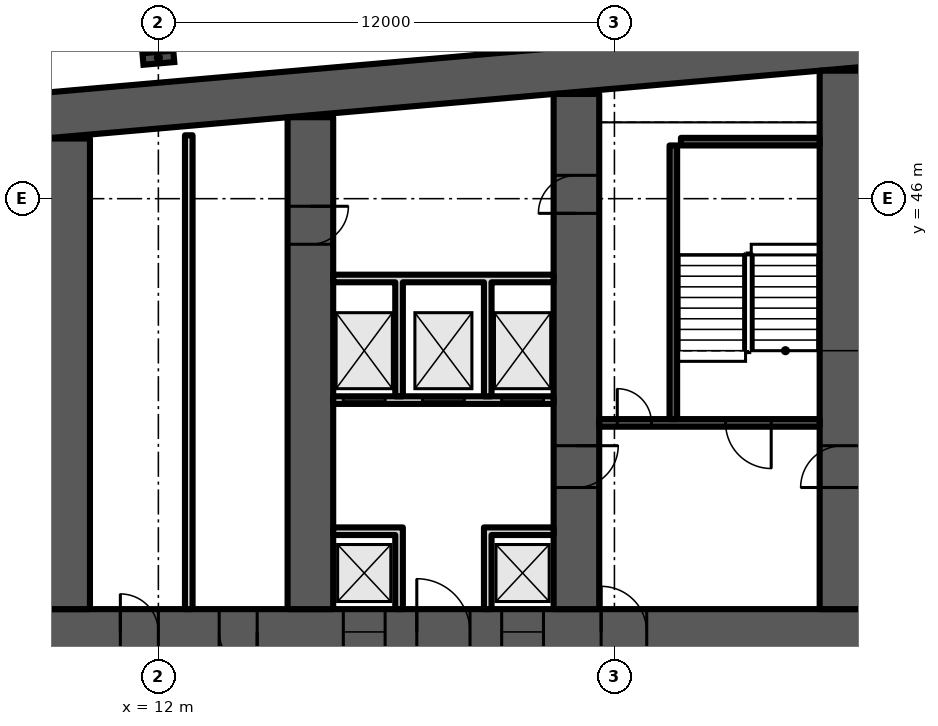
"""IFC4 building model, lengths in metres.
Left out: names, types, materials, properties, quantities, classifications, styles, units other than length and angle.
Written with IfcOpenShell. Run it as: python <this file> out.ifc"""

import sys

from ifc_helpers import new_model, si_unit, direction, frame, frame_2d, origin, origin_2d, place, context, subcontext, project, spatial, polyline, rectangle, i_section, outline, extrude, element, fill, save


model = new_model("IFC4")
c1 = context("Model", 3, precision=1e-05, world=origin(), true_north=direction((0.0, 1.0)))
c2 = subcontext(c1, "Body", "Model", "MODEL_VIEW")
j1 = project(units=[si_unit("LENGTHUNIT", "METRE"), si_unit("PLANEANGLEUNIT", "RADIAN")], contexts=[c1])
p1 = place(None, origin())
s1 = spatial("IfcSite", under=j1, at=p1, CompositionType="ELEMENT")
p2 = place(p1, origin())
s2 = spatial("IfcBuilding", under=s1, at=p2, CompositionType="ELEMENT")
p3 = place(p2, frame((0.0, 0.0, 81.1)))
s3 = spatial("IfcBuildingStorey", under=s2, at=p3, CompositionType="ELEMENT", Elevation=81.1)
p4 = place(p3, frame((0.0, 0.0, -0.0)))
e1 = element("IfcWall", 1, at=p4, inside=s3, PredefinedType="SHEAR", context=c2, shape_type="SweptSolid", body=[
    extrude(outline(polyline([(9.0, 47.583), (37.0, 50.032), (65.0, 47.583), (65.0, 48.787), (37.0, 51.237), (9.0, 48.787), (9.0, 47.583)])), origin(), (0.0, 0.0, 1.0), 3.6),
])
p5 = place(p3, frame((9.0, 34.6, 0.0), z_axis=(0.0, 0.0, 1.0), x_axis=(1.0, 0.0, 0.0)))
e2 = element("IfcWall", 2, at=p5, inside=s3, PredefinedType="SHEAR", context=c2, shape_type="SweptSolid", body=[
    extrude(rectangle(XDim=56.0, YDim=1.2, at=frame_2d((28.0, 0.0))), origin(), (0.0, 0.0, 1.0), 3.6),
])
p6 = place(p5, frame((2.0, 0.0, 0.0)))
e3 = element("IfcOpeningElement", 3, at=p6, cuts=e2, PredefinedType="OPENING", context=c2, shape_type="SweptSolid", body=[
    extrude(rectangle(XDim=1.0, YDim=2.1, at=frame_2d((0.5, 1.05))), frame((0.0, 0.61, 0.0), z_axis=(0.0, -1.0, 0.0), x_axis=(1.0, 0.0, 0.0)), (0.0, 0.0, 1.0), 1.22),
])
p7 = place(p5, frame((4.6, 0.0, 0.0)))
e4 = element("IfcOpeningElement", 4, at=p7, cuts=e2, PredefinedType="OPENING", context=c2, shape_type="SweptSolid", body=[
    extrude(rectangle(XDim=1.0, YDim=2.1, at=frame_2d((0.5, 1.05))), frame((0.0, 0.61, 0.0), z_axis=(0.0, -1.0, 0.0), x_axis=(1.0, 0.0, 0.0)), (0.0, 0.0, 1.0), 1.22),
])
p8 = place(p5, frame((7.867, 0.0, 0.0)))
e5 = element("IfcOpeningElement", 5, at=p8, cuts=e2, PredefinedType="OPENING", context=c2, shape_type="SweptSolid", body=[
    extrude(rectangle(XDim=1.1, YDim=2.1, at=frame_2d((0.55, 1.05))), frame((0.0, 0.61, 0.0), z_axis=(0.0, -1.0, 0.0), x_axis=(1.0, 0.0, 0.0)), (0.0, 0.0, 1.0), 1.22),
])
p9 = place(p5, frame((12.033, 0.0, 0.0)))
e6 = element("IfcOpeningElement", 6, at=p9, cuts=e2, PredefinedType="OPENING", context=c2, shape_type="SweptSolid", body=[
    extrude(rectangle(XDim=1.1, YDim=2.1, at=frame_2d((0.55, 1.05))), frame((0.0, 0.61, 0.0), z_axis=(0.0, -1.0, 0.0), x_axis=(1.0, 0.0, 0.0)), (0.0, 0.0, 1.0), 1.22),
])
p10 = place(p5, frame((9.8, 0.0, 0.0)))
e7 = element("IfcOpeningElement", 7, at=p10, cuts=e2, PredefinedType="OPENING", context=c2, shape_type="SweptSolid", body=[
    extrude(rectangle(XDim=1.4, YDim=2.1, at=frame_2d((0.7, 1.05))), frame((0.0, 0.61, 0.0), z_axis=(0.0, -1.0, 0.0), x_axis=(1.0, 0.0, 0.0)), (0.0, 0.0, 1.0), 1.22),
])
p11 = place(p5, frame((14.65, 0.0, 0.0)))
e8 = element("IfcOpeningElement", 8, at=p11, cuts=e2, PredefinedType="OPENING", context=c2, shape_type="SweptSolid", body=[
    extrude(rectangle(XDim=1.2, YDim=2.1, at=frame_2d((0.6, 1.05))), frame((0.0, 0.61, 0.0), z_axis=(0.0, -1.0, 0.0), x_axis=(1.0, 0.0, 0.0)), (0.0, 0.0, 1.0), 1.22),
])
p12 = place(p5, frame((21.867, 0.0, 0.0)))
e9 = element("IfcOpeningElement", 9, at=p12, cuts=e2, PredefinedType="OPENING", context=c2, shape_type="SweptSolid", body=[
    extrude(rectangle(XDim=1.1, YDim=2.1, at=frame_2d((0.55, 1.05))), frame((0.0, 0.61, 0.0), z_axis=(0.0, -1.0, 0.0), x_axis=(1.0, 0.0, 0.0)), (0.0, 0.0, 1.0), 1.22),
])
p13 = place(p5, frame((26.033, 0.0, 0.0)))
e10 = element("IfcOpeningElement", 10, at=p13, cuts=e2, PredefinedType="OPENING", context=c2, shape_type="SweptSolid", body=[
    extrude(rectangle(XDim=1.1, YDim=2.1, at=frame_2d((0.55, 1.05))), frame((0.0, 0.61, 0.0), z_axis=(0.0, -1.0, 0.0), x_axis=(1.0, 0.0, 0.0)), (0.0, 0.0, 1.0), 1.22),
])
p14 = place(p5, frame((23.8, 0.0, 0.0)))
e11 = element("IfcOpeningElement", 11, at=p14, cuts=e2, PredefinedType="OPENING", context=c2, shape_type="SweptSolid", body=[
    extrude(rectangle(XDim=1.4, YDim=2.1, at=frame_2d((0.7, 1.05))), frame((0.0, 0.61, 0.0), z_axis=(0.0, -1.0, 0.0), x_axis=(1.0, 0.0, 0.0)), (0.0, 0.0, 1.0), 1.22),
])
p15 = place(p5, frame((28.867, 0.0, 0.0)))
e12 = element("IfcOpeningElement", 12, at=p15, cuts=e2, PredefinedType="OPENING", context=c2, shape_type="SweptSolid", body=[
    extrude(rectangle(XDim=1.1, YDim=2.1, at=frame_2d((0.55, 1.05))), frame((0.0, 0.61, 0.0), z_axis=(0.0, -1.0, 0.0), x_axis=(1.0, 0.0, 0.0)), (0.0, 0.0, 1.0), 1.22),
])
p16 = place(p5, frame((33.033, 0.0, 0.0)))
e13 = element("IfcOpeningElement", 13, at=p16, cuts=e2, PredefinedType="OPENING", context=c2, shape_type="SweptSolid", body=[
    extrude(rectangle(XDim=1.1, YDim=2.1, at=frame_2d((0.55, 1.05))), frame((0.0, 0.61, 0.0), z_axis=(0.0, -1.0, 0.0), x_axis=(1.0, 0.0, 0.0)), (0.0, 0.0, 1.0), 1.22),
])
p17 = place(p5, frame((40.15, 0.0, 0.0)))
e14 = element("IfcOpeningElement", 14, at=p17, cuts=e2, PredefinedType="OPENING", context=c2, shape_type="SweptSolid", body=[
    extrude(rectangle(XDim=1.2, YDim=2.1, at=frame_2d((0.6, 1.05))), frame((0.0, 0.61, 0.0), z_axis=(0.0, -1.0, 0.0), x_axis=(1.0, 0.0, 0.0)), (0.0, 0.0, 1.0), 1.22),
])
p18 = place(p5, frame((44.8, 0.0, 0.0)))
e15 = element("IfcOpeningElement", 15, at=p18, cuts=e2, PredefinedType="OPENING", context=c2, shape_type="SweptSolid", body=[
    extrude(rectangle(XDim=1.4, YDim=2.1, at=frame_2d((0.7, 1.05))), frame((0.0, 0.61, 0.0), z_axis=(0.0, -1.0, 0.0), x_axis=(1.0, 0.0, 0.0)), (0.0, 0.0, 1.0), 1.22),
])
p19 = place(p5, frame((49.867, 0.0, 0.0)))
e16 = element("IfcOpeningElement", 16, at=p19, cuts=e2, PredefinedType="OPENING", context=c2, shape_type="SweptSolid", body=[
    extrude(rectangle(XDim=1.1, YDim=2.1, at=frame_2d((0.55, 1.05))), frame((0.0, 0.61, 0.0), z_axis=(0.0, -1.0, 0.0), x_axis=(1.0, 0.0, 0.0)), (0.0, 0.0, 1.0), 1.22),
])
p20 = place(p5, frame((53.5, 0.0, 0.0)))
e17 = element("IfcOpeningElement", 17, at=p20, cuts=e2, PredefinedType="OPENING", context=c2, shape_type="SweptSolid", body=[
    extrude(rectangle(XDim=1.1, YDim=2.1, at=frame_2d((0.55, 1.05))), frame((0.0, 0.61, 0.0), z_axis=(0.0, -1.0, 0.0), x_axis=(1.0, 0.0, 0.0)), (0.0, 0.0, 1.0), 1.22),
])
p21 = place(p5, frame((51.567, 0.0, 0.0)))
e18 = element("IfcOpeningElement", 18, at=p21, cuts=e2, PredefinedType="OPENING", context=c2, shape_type="SweptSolid", body=[
    extrude(rectangle(XDim=1.4, YDim=2.1, at=frame_2d((0.7, 1.05))), frame((0.0, 0.61, 0.0), z_axis=(0.0, -1.0, 0.0), x_axis=(1.0, 0.0, 0.0)), (0.0, 0.0, 1.0), 1.22),
])
p22 = place(p3, frame((9.6, 35.2, 0.0), z_axis=(0.0, 0.0, 1.0), x_axis=(0.0, 1.0, 0.0)))
e19 = element("IfcWall", 19, at=p22, inside=s3, PredefinedType="SHEAR", context=c2, shape_type="SweptSolid", body=[
    extrude(rectangle(XDim=12.383, YDim=1.2, at=frame_2d((6.191, 0.0))), origin(), (0.0, 0.0, 1.0), 3.6),
])
p23 = place(p3, frame((16.0, 35.2, 0.0), z_axis=(0.0, 0.0, 1.0), x_axis=(0.0, 1.0, 0.0)))
e20 = element("IfcWall", 20, at=p23, inside=s3, PredefinedType="SHEAR", context=c2, shape_type="SweptSolid", body=[
    extrude(rectangle(XDim=12.943, YDim=1.2, at=frame_2d((6.471, 0.0))), origin(), (0.0, 0.0, 1.0), 3.6),
])
p24 = place(p23, frame((9.6, 0.0, 0.0)))
e21 = element("IfcOpeningElement", 21, at=p24, cuts=e20, PredefinedType="OPENING", context=c2, shape_type="SweptSolid", body=[
    extrude(rectangle(XDim=1.0, YDim=2.1, at=frame_2d((0.5, 1.05))), frame((0.0, 0.61, 0.0), z_axis=(0.0, -1.0, 0.0), x_axis=(1.0, 0.0, 0.0)), (0.0, 0.0, 1.0), 1.22),
])
p25 = place(p3, frame((23.0, 35.2, 0.0), z_axis=(0.0, 0.0, 1.0), x_axis=(0.0, 1.0, 0.0)))
e22 = element("IfcWall", 22, at=p25, inside=s3, PredefinedType="SHEAR", context=c2, shape_type="SweptSolid", body=[
    extrude(rectangle(XDim=13.555, YDim=1.2, at=frame_2d((6.778, 0.0))), origin(), (0.0, 0.0, 1.0), 3.6),
])
p26 = place(p25, frame((10.414, 0.0, 0.0)))
e23 = element("IfcOpeningElement", 23, at=p26, cuts=e22, PredefinedType="OPENING", context=c2, shape_type="SweptSolid", body=[
    extrude(rectangle(XDim=1.0, YDim=2.1, at=frame_2d((0.5, 1.05))), frame((0.0, 0.61, 0.0), z_axis=(0.0, -1.0, 0.0), x_axis=(1.0, 0.0, 0.0)), (0.0, 0.0, 1.0), 1.22),
])
p27 = place(p25, frame((3.2, 0.0, 0.0)))
e24 = element("IfcOpeningElement", 24, at=p27, cuts=e22, PredefinedType="OPENING", context=c2, shape_type="SweptSolid", body=[
    extrude(rectangle(XDim=1.1, YDim=2.1, at=frame_2d((0.55, 1.05))), frame((0.0, 0.61, 0.0), z_axis=(0.0, -1.0, 0.0), x_axis=(1.0, 0.0, 0.0)), (0.0, 0.0, 1.0), 1.22),
])
p28 = place(p3, frame((30.0, 35.2, 0.0), z_axis=(0.0, 0.0, 1.0), x_axis=(0.0, 1.0, 0.0)))
e25 = element("IfcWall", 25, at=p28, inside=s3, PredefinedType="SHEAR", context=c2, shape_type="SweptSolid", body=[
    extrude(rectangle(XDim=14.168, YDim=1.2, at=frame_2d((7.084, 0.0))), origin(), (0.0, 0.0, 1.0), 3.6),
])
p29 = place(p28, frame((3.2, 0.0, 0.0)))
e26 = element("IfcOpeningElement", 26, at=p29, cuts=e25, PredefinedType="OPENING", context=c2, shape_type="SweptSolid", body=[
    extrude(rectangle(XDim=1.1, YDim=2.1, at=frame_2d((0.55, 1.05))), frame((0.0, 0.61, 0.0), z_axis=(0.0, -1.0, 0.0), x_axis=(1.0, 0.0, 0.0)), (0.0, 0.0, 1.0), 1.22),
])
p30 = place(p3, frame((12.0, 49.71, 0.0), z_axis=(0.0, 0.0, 1.0), x_axis=(-0.087156, 0.996197, 0.0)))
e27 = element("IfcColumn", 27, at=p30, inside=s3, PredefinedType="COLUMN", context=c2, shape_type="SweptSolid", body=[
    extrude(i_section(OverallWidth=0.303, OverallDepth=0.814, WebThickness=0.021, FlangeThickness=0.04, FilletRadius=0.03, at=origin_2d()), origin(), (0.0, 0.0, 1.0), 3.6),
])
p31 = place(p3, frame((12.8, 35.2, 0.0), z_axis=(0.0, 0.0, 1.0), x_axis=(0.0, 1.0, 0.0)))
e28 = element("IfcWall", 28, at=p31, inside=s3, PredefinedType="PARTITIONING", context=c2, shape_type="SweptSolid", body=[
    extrude(rectangle(XDim=12.468, YDim=0.2, at=frame_2d((6.234, 0.0))), origin(), (0.0, 0.0, 1.0), 3.2),
])
p32 = place(p3, frame((16.6, 40.7, 0.0), z_axis=(0.0, 0.0, 1.0), x_axis=(1.0, 0.0, 0.0)))
e29 = element("IfcWall", 29, at=p32, inside=s3, PredefinedType="PARTITIONING", context=c2, shape_type="SweptSolid", body=[
    extrude(rectangle(XDim=5.8, YDim=0.2, at=frame_2d((2.9, 0.0))), origin(), (0.0, 0.0, 1.0), 3.2),
])
p33 = place(p32, frame((0.267, 0.0, 0.0)))
e30 = element("IfcOpeningElement", 30, at=p33, cuts=e29, PredefinedType="OPENING", context=c2, shape_type="SweptSolid", body=[
    extrude(rectangle(XDim=1.1, YDim=2.1, at=frame_2d((0.55, 1.05))), frame((0.0, 0.11, 0.0), z_axis=(0.0, -1.0, 0.0), x_axis=(1.0, 0.0, 0.0)), (0.0, 0.0, 1.0), 0.22),
])
p34 = place(p32, frame((2.35, 0.0, 0.0)))
e31 = element("IfcOpeningElement", 31, at=p34, cuts=e29, PredefinedType="OPENING", context=c2, shape_type="SweptSolid", body=[
    extrude(rectangle(XDim=1.1, YDim=2.1, at=frame_2d((0.55, 1.05))), frame((0.0, 0.11, 0.0), z_axis=(0.0, -1.0, 0.0), x_axis=(1.0, 0.0, 0.0)), (0.0, 0.0, 1.0), 0.22),
])
p35 = place(p32, frame((4.433, 0.0, 0.0)))
e32 = element("IfcOpeningElement", 32, at=p35, cuts=e29, PredefinedType="OPENING", context=c2, shape_type="SweptSolid", body=[
    extrude(rectangle(XDim=1.1, YDim=2.1, at=frame_2d((0.55, 1.05))), frame((0.0, 0.11, 0.0), z_axis=(0.0, -1.0, 0.0), x_axis=(1.0, 0.0, 0.0)), (0.0, 0.0, 1.0), 0.22),
])
p36 = place(p3, frame((0.0, 0.0, -0.0)))
e33 = element("IfcWall", 33, at=p36, inside=s3, PredefinedType="PARTITIONING", context=c2, shape_type="SweptSolid", body=[
    extrude(outline(polyline([(18.233, 37.15), (16.6, 37.15), (16.6, 37.35), (18.233, 37.35), (18.433, 37.35), (18.433, 35.2), (18.233, 35.2), (18.233, 37.15)])), origin(), (0.0, 0.0, 1.0), 3.2),
])
p37 = place(p3, frame((0.0, 0.0, -0.0)))
e34 = element("IfcWall", 34, at=p37, inside=s3, PredefinedType="PARTITIONING", context=c2, shape_type="SweptSolid", body=[
    extrude(outline(polyline([(20.567, 37.35), (20.767, 37.35), (22.4, 37.35), (22.4, 37.15), (20.767, 37.15), (20.767, 35.2), (20.567, 35.2), (20.567, 37.35)])), origin(), (0.0, 0.0, 1.0), 3.2),
])
p38 = place(p3, frame((0.0, 0.0, -0.0)))
e35 = element("IfcWall", 35, at=p38, inside=s3, PredefinedType="PARTITIONING", context=c2, shape_type="SweptSolid", body=[
    extrude(outline(polyline([(18.433, 40.8), (18.233, 40.8), (18.233, 43.8), (16.6, 43.8), (16.6, 44.0), (22.4, 44.0), (22.4, 43.8), (20.767, 43.8), (20.767, 40.8), (20.567, 40.8), (20.567, 43.8), (18.433, 43.8), (18.433, 40.8)])), origin(), (0.0, 0.0, 1.0), 3.2),
])
p39 = place(p3, frame((23.6, 40.1, 0.0), z_axis=(0.0, 0.0, 1.0), x_axis=(1.0, 0.0, 0.0)))
e36 = element("IfcWall", 36, at=p39, inside=s3, PredefinedType="SHEAR", context=c2, shape_type="SweptSolid", body=[
    extrude(rectangle(XDim=5.8, YDim=0.2, at=frame_2d((2.9, 0.0))), origin(), (0.0, 0.0, 1.0), 3.2),
])
p40 = place(p39, frame((3.325, 0.0, 0.0)))
e37 = element("IfcOpeningElement", 37, at=p40, cuts=e36, PredefinedType="OPENING", context=c2, shape_type="SweptSolid", body=[
    extrude(rectangle(XDim=1.2, YDim=2.1, at=frame_2d((0.6, 1.05))), frame((0.0, 0.11, 0.0), z_axis=(0.0, -1.0, 0.0), x_axis=(1.0, 0.0, 0.0)), (0.0, 0.0, 1.0), 0.22),
])
p41 = place(p39, frame((0.475, 0.0, 0.0)))
e38 = element("IfcOpeningElement", 38, at=p41, cuts=e36, PredefinedType="OPENING", context=c2, shape_type="SweptSolid", body=[
    extrude(rectangle(XDim=0.9, YDim=2.1, at=frame_2d((0.45, 1.05))), frame((0.0, 0.11, 0.0), z_axis=(0.0, -1.0, 0.0), x_axis=(1.0, 0.0, 0.0)), (0.0, 0.0, 1.0), 0.22),
])
p42 = place(p3, frame((25.55, 40.2, 0.0), z_axis=(0.0, 0.0, 1.0), x_axis=(0.0, 1.0, 0.0)))
e39 = element("IfcWall", 39, at=p42, inside=s3, PredefinedType="SHEAR", context=c2, shape_type="SweptSolid", body=[
    extrude(rectangle(XDim=7.2, YDim=0.2, at=frame_2d((3.6, 0.0))), origin(), (0.0, 0.0, 1.0), 3.2),
])
p43 = place(p3, frame((25.75, 47.5, 0.0), z_axis=(0.0, 0.0, 1.0), x_axis=(1.0, 0.0, 0.0)))
e40 = element("IfcWall", 40, at=p43, inside=s3, PredefinedType="SHEAR", context=c2, shape_type="SweptSolid", body=[
    extrude(rectangle(XDim=3.65, YDim=0.2, at=frame_2d((1.825, 0.0))), origin(), (0.0, 0.0, 1.0), 3.2),
])
p44 = place(p6, origin())
e41 = element("IfcDoor", 41, at=p44, inside=s3, OperationType="SINGLE_SWING_LEFT", PredefinedType="DOOR", context=c2, shape_type="SweptSolid", body=[
    extrude(rectangle(XDim=1.0, YDim=2.1, at=frame_2d((0.5, 1.05))), frame((0.0, 0.6, 0.0), z_axis=(0.0, -1.0, 0.0), x_axis=(1.0, 0.0, 0.0)), (0.0, 0.0, 1.0), 1.199),
])
fill(e3, e41)
p45 = place(p7, origin())
e42 = element("IfcDoor", 42, at=p45, inside=s3, OperationType="SINGLE_SWING_RIGHT", PredefinedType="DOOR", context=c2, shape_type="SweptSolid", body=[
    extrude(rectangle(XDim=1.0, YDim=2.1, at=frame_2d((0.5, 1.05))), frame((0.0, 0.6, 0.0), z_axis=(0.0, -1.0, 0.0), x_axis=(1.0, 0.0, 0.0)), (0.0, 0.0, 1.0), 1.199),
])
fill(e4, e42)
p46 = place(p8, origin())
e43 = element("IfcDoor", 43, at=p46, inside=s3, OperationType="DOUBLE_DOOR_SLIDING", PredefinedType="DOOR", context=c2, shape_type="SweptSolid", body=[
    extrude(rectangle(XDim=1.1, YDim=2.1, at=frame_2d((0.55, 1.05))), frame((0.0, 0.025, 0.0), z_axis=(0.0, -1.0, 0.0), x_axis=(1.0, 0.0, 0.0)), (0.0, 0.0, 1.0), 0.05),
])
fill(e5, e43)
p47 = place(p9, origin())
e44 = element("IfcDoor", 44, at=p47, inside=s3, OperationType="DOUBLE_DOOR_SLIDING", PredefinedType="DOOR", context=c2, shape_type="SweptSolid", body=[
    extrude(rectangle(XDim=1.1, YDim=2.1, at=frame_2d((0.55, 1.05))), frame((0.0, 0.025, 0.0), z_axis=(0.0, -1.0, 0.0), x_axis=(1.0, 0.0, 0.0)), (0.0, 0.0, 1.0), 0.05),
])
fill(e6, e44)
p48 = place(p10, origin())
e45 = element("IfcDoor", 45, at=p48, inside=s3, OperationType="DOUBLE_DOOR_SINGLE_SWING", PredefinedType="DOOR", context=c2, shape_type="SweptSolid", body=[
    extrude(rectangle(XDim=1.4, YDim=2.1, at=frame_2d((0.7, 1.05))), frame((0.0, 0.025, 0.0), z_axis=(0.0, -1.0, 0.0), x_axis=(1.0, 0.0, 0.0)), (0.0, 0.0, 1.0), 0.05),
])
fill(e7, e45)
p49 = place(p33, origin())
e46 = element("IfcDoor", 46, at=p49, inside=s3, OperationType="DOUBLE_DOOR_SLIDING", PredefinedType="DOOR", context=c2, shape_type="SweptSolid", body=[
    extrude(rectangle(XDim=1.1, YDim=2.1, at=frame_2d((0.55, 1.05))), frame((0.0, 0.025, 0.0), z_axis=(0.0, -1.0, 0.0), x_axis=(1.0, 0.0, 0.0)), (0.0, 0.0, 1.0), 0.05),
])
fill(e30, e46)
p50 = place(p34, origin())
e47 = element("IfcDoor", 47, at=p50, inside=s3, OperationType="DOUBLE_DOOR_SLIDING", PredefinedType="DOOR", context=c2, shape_type="SweptSolid", body=[
    extrude(rectangle(XDim=1.1, YDim=2.1, at=frame_2d((0.55, 1.05))), frame((0.0, 0.025, 0.0), z_axis=(0.0, -1.0, 0.0), x_axis=(1.0, 0.0, 0.0)), (0.0, 0.0, 1.0), 0.05),
])
fill(e31, e47)
p51 = place(p35, origin())
e48 = element("IfcDoor", 48, at=p51, inside=s3, OperationType="DOUBLE_DOOR_SLIDING", PredefinedType="DOOR", context=c2, shape_type="SweptSolid", body=[
    extrude(rectangle(XDim=1.1, YDim=2.1, at=frame_2d((0.55, 1.05))), frame((0.0, 0.025, 0.0), z_axis=(0.0, -1.0, 0.0), x_axis=(1.0, 0.0, 0.0)), (0.0, 0.0, 1.0), 0.05),
])
fill(e32, e48)
p52 = place(p26, origin())
e49 = element("IfcDoor", 49, at=p52, inside=s3, OperationType="SINGLE_SWING_LEFT", PredefinedType="DOOR", context=c2, shape_type="SweptSolid", body=[
    extrude(rectangle(XDim=1.0, YDim=2.1, at=frame_2d((0.5, 1.05))), frame((0.0, 0.6, 0.0), z_axis=(0.0, -1.0, 0.0), x_axis=(1.0, 0.0, 0.0)), (0.0, 0.0, 1.0), 1.199),
])
fill(e23, e49)
p53 = place(p40, origin())
e50 = element("IfcDoor", 50, at=p53, inside=s3, OperationType="SINGLE_SWING_RIGHT", PredefinedType="DOOR", context=c2, shape_type="SweptSolid", body=[
    extrude(rectangle(XDim=1.2, YDim=2.1, at=frame_2d((0.6, 1.05))), frame((0.0, 0.025, 0.0), z_axis=(0.0, -1.0, 0.0), x_axis=(1.0, 0.0, 0.0)), (0.0, 0.0, 1.0), 0.05),
])
fill(e37, e50)
p54 = place(p41, origin())
e51 = element("IfcDoor", 51, at=p54, inside=s3, OperationType="SINGLE_SWING_LEFT", PredefinedType="DOOR", context=c2, shape_type="SweptSolid", body=[
    extrude(rectangle(XDim=0.9, YDim=2.1, at=frame_2d((0.45, 1.05))), frame((0.0, 0.025, 0.0), z_axis=(0.0, -1.0, 0.0), x_axis=(1.0, 0.0, 0.0)), (0.0, 0.0, 1.0), 0.05),
])
fill(e38, e51)
p55 = place(p11, origin())
e52 = element("IfcDoor", 52, at=p55, inside=s3, OperationType="SINGLE_SWING_LEFT", PredefinedType="DOOR", context=c2, shape_type="SweptSolid", body=[
    extrude(rectangle(XDim=1.2, YDim=2.1, at=frame_2d((0.6, 1.05))), frame((0.0, 0.025, 0.0), z_axis=(0.0, -1.0, 0.0), x_axis=(1.0, 0.0, 0.0)), (0.0, 0.0, 1.0), 0.05),
])
fill(e8, e52)
p56 = place(p24, origin())
e53 = element("IfcDoor", 53, at=p56, inside=s3, OperationType="SINGLE_SWING_RIGHT", PredefinedType="DOOR", context=c2, shape_type="SweptSolid", body=[
    extrude(rectangle(XDim=1.0, YDim=2.1, at=frame_2d((0.5, 1.05))), frame((0.0, 0.6, 0.0), z_axis=(0.0, -1.0, 0.0), x_axis=(1.0, 0.0, 0.0)), (0.0, 0.0, 1.0), 1.199),
])
fill(e21, e53)
p57 = place(p27, origin())
e54 = element("IfcDoor", 54, at=p57, inside=s3, OperationType="SINGLE_SWING_RIGHT", PredefinedType="DOOR", context=c2, shape_type="SweptSolid", body=[
    extrude(rectangle(XDim=1.1, YDim=2.1, at=frame_2d((0.55, 1.05))), frame((0.0, 0.025, 0.0), z_axis=(0.0, -1.0, 0.0), x_axis=(1.0, 0.0, 0.0)), (0.0, 0.0, 1.0), 0.05),
])
fill(e24, e54)
p58 = place(p29, origin())
e55 = element("IfcDoor", 55, at=p58, inside=s3, OperationType="SINGLE_SWING_LEFT", PredefinedType="DOOR", context=c2, shape_type="SweptSolid", body=[
    extrude(rectangle(XDim=1.1, YDim=2.1, at=frame_2d((0.55, 1.05))), frame((0.0, 0.025, 0.0), z_axis=(0.0, -1.0, 0.0), x_axis=(1.0, 0.0, 0.0)), (0.0, 0.0, 1.0), 0.05),
])
fill(e26, e55)
save(model, sys.argv[1])
